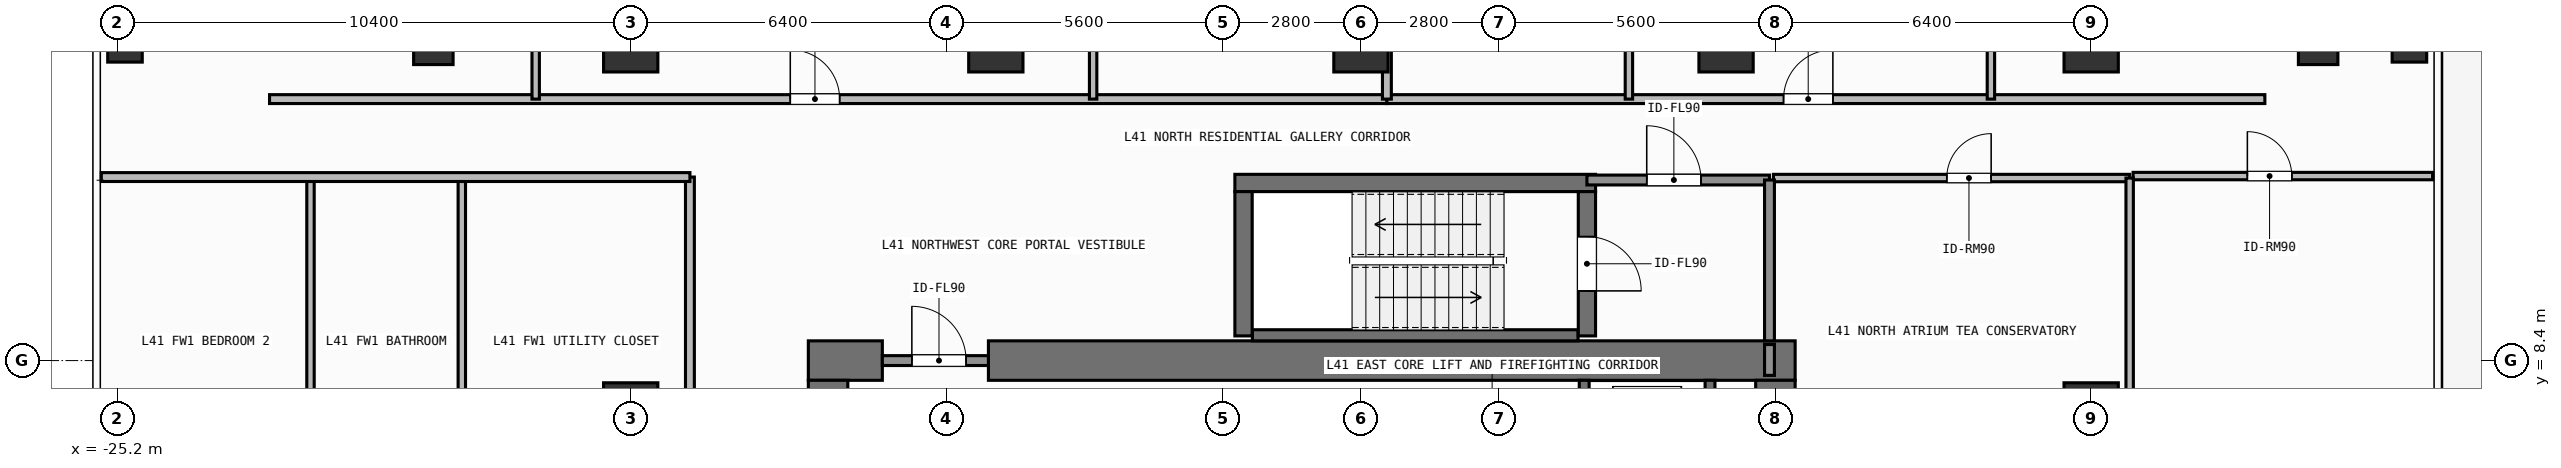
"""IFC4 building model, lengths in metres.
Left out: names, types, materials, properties, quantities, classifications, styles, units other than length and angle.
Written with IfcOpenShell. Run it as: python <this file> out.ifc"""

import sys

from ifc_helpers import new_model, si_unit, direction, frame, frame_2d, origin, origin_2d, place, context, subcontext, project, spatial, rectangle, hollow_rectangle, extrude, element, fill, save


model = new_model("IFC4")
c1 = context("Model", 3, precision=1e-05, world=origin(), true_north=direction((0.0, 1.0)))
c2 = subcontext(c1, "Body", "Model", "MODEL_VIEW")
j1 = project(units=[si_unit("LENGTHUNIT", "METRE"), si_unit("PLANEANGLEUNIT", "RADIAN")], contexts=[c1])
p1 = place(None, origin())
s1 = spatial("IfcSite", under=j1, at=p1, CompositionType="ELEMENT")
p2 = place(p1, origin())
s2 = spatial("IfcBuilding", under=s1, at=p2, CompositionType="ELEMENT")
p3 = place(p2, frame((0.0, 0.0, 168.0)))
s3 = spatial("IfcBuildingStorey", under=s2, at=p3, CompositionType="ELEMENT", Elevation=168.0)
p4 = place(p3, frame((-11.2, 8.4, 0.0), z_axis=(0.0, 0.0, 1.0), x_axis=(1.0, 0.0, 0.0)))
e1 = element("IfcWall", 1, at=p4, inside=s3, PredefinedType="SHEAR", context=c2, shape_type="SweptSolid", body=[
    extrude(rectangle(XDim=1.5, YDim=0.8, at=frame_2d((0.75, 0.0))), origin(), (0.0, 0.0, 1.0), 3.9),
])
p5 = place(p3, frame((-7.55, 8.4, 0.0), z_axis=(0.0, 0.0, 1.0), x_axis=(1.0, 0.0, 0.0)))
e2 = element("IfcWall", 2, at=p5, inside=s3, PredefinedType="SHEAR", context=c2, shape_type="SweptSolid", body=[
    extrude(rectangle(XDim=16.35, YDim=0.8, at=frame_2d((8.175, 0.0))), origin(), (0.0, 0.0, 1.0), 3.9),
])
p6 = place(p3, frame((-10.8, -8.0, 0.0), z_axis=(0.0, 0.0, 1.0), x_axis=(0.0, 1.0, 0.0)))
e3 = element("IfcWall", 3, at=p6, inside=s3, PredefinedType="SHEAR", context=c2, shape_type="SweptSolid", body=[
    extrude(rectangle(XDim=16.0, YDim=0.8, at=frame_2d((8.0, 0.0))), origin(), (0.0, 0.0, 1.0), 3.9),
])
p7 = place(p3, frame((8.4, 5.825, 0.0), z_axis=(0.0, 0.0, 1.0), x_axis=(0.0, 1.0, 0.0)))
e4 = element("IfcWall", 4, at=p7, inside=s3, PredefinedType="SHEAR", context=c2, shape_type="SweptSolid", body=[
    extrude(rectangle(XDim=2.175, YDim=0.8, at=frame_2d((1.087, 0.0))), origin(), (0.0, 0.0, 1.0), 3.9),
])
p8 = place(p3, frame((-2.555, 12.0, 0.0), z_axis=(0.0, 0.0, 1.0), x_axis=(1.0, 0.0, 0.0)))
e5 = element("IfcWall", 5, at=p8, inside=s3, PredefinedType="SHEAR", context=c2, shape_type="SweptSolid", body=[
    extrude(rectangle(XDim=7.31, YDim=0.35, at=frame_2d((3.655, 0.0))), origin(), (0.0, 0.0, 1.0), 3.9),
])
p9 = place(p3, frame((-2.2, 8.913, 0.0), z_axis=(0.0, 0.0, 1.0), x_axis=(1.0, 0.0, 0.0)))
e6 = element("IfcWall", 6, at=p9, inside=s3, PredefinedType="SHEAR", context=c2, shape_type="SweptSolid", body=[
    extrude(rectangle(XDim=6.6, YDim=0.225, at=frame_2d((3.3, 0.0))), origin(), (0.0, 0.0, 1.0), 3.9),
])
p10 = place(p3, frame((-2.38, 8.9, 0.0), z_axis=(0.0, 0.0, 1.0), x_axis=(0.0, 1.0, 0.0)))
e7 = element("IfcWall", 7, at=p10, inside=s3, PredefinedType="SHEAR", context=c2, shape_type="SweptSolid", body=[
    extrude(rectangle(XDim=2.925, YDim=0.35, at=frame_2d((1.462, 0.0))), origin(), (0.0, 0.0, 1.0), 3.9),
])
p11 = place(p3, frame((4.58, 11.825, 0.0), z_axis=(0.0, 0.0, 1.0), x_axis=(0.0, -1.0, 0.0)))
e8 = element("IfcWall", 8, at=p11, inside=s3, PredefinedType="SHEAR", context=c2, shape_type="SweptSolid", body=[
    extrude(rectangle(XDim=2.925, YDim=0.35, at=frame_2d((1.462, 0.0))), origin(), (0.0, 0.0, 1.0), 3.9),
])
p12 = place(p11, frame((0.913, 0.0, 0.0)))
e9 = element("IfcOpeningElement", 9, at=p12, cuts=e8, PredefinedType="OPENING", context=c2, shape_type="SweptSolid", body=[
    extrude(rectangle(XDim=1.1, YDim=2.15, at=frame_2d((0.55, 1.075))), frame((0.0, 0.185, 0.0), z_axis=(0.0, -1.0, 0.0), x_axis=(1.0, 0.0, 0.0)), (0.0, 0.0, 1.0), 0.37),
])
for number, where, z_axis, x_axis in (
    (10, (-14.8, 14.8, 0.0), (0.0, 0.0, 1.0), (1.0, 0.0, 0.0)),
    (11, (-7.4, 14.8, 0.0), (0.0, 0.0, 1.0), (1.0, 0.0, 0.0)),
    (12, (0.0, 14.8, 0.0), (0.0, 0.0, 1.0), (1.0, 0.0, 0.0)),
    (13, (7.4, 14.8, 0.0), (0.0, 0.0, 1.0), (1.0, 0.0, 0.0)),
    (14, (14.8, 14.8, 0.0), (0.0, 0.0, 1.0), (1.0, 0.0, 0.0)),
    (15, (-14.8, 7.4, 0.0), (0.0, 0.0, 1.0), (1.0, 0.0, 0.0)),
    (16, (14.8, 7.4, 0.0), (0.0, 0.0, 1.0), (1.0, 0.0, 0.0)),
):
    element("IfcColumn", number, at=place(p3, frame(where, z_axis=z_axis, x_axis=x_axis)), inside=s3, PredefinedType="COLUMN", context=c2, shape_type="SweptSolid", body=[
        extrude(rectangle(XDim=1.1, YDim=1.1, at=origin_2d()), origin(), (0.0, 0.0, 1.0), 3.9),
    ])
for number, where, z_axis, x_axis in (
    (17, (-18.8, 14.8, 0.0), (0.0, 0.0, 1.0), (1.0, 0.0, 0.0)),
    (18, (19.4, 14.8, 0.0), (0.0, 0.0, 1.0), (1.0, 0.0, 0.0)),
):
    element("IfcColumn", number, at=place(p3, frame(where, z_axis=z_axis, x_axis=x_axis)), inside=s3, PredefinedType="COLUMN", context=c2, shape_type="SweptSolid", body=[
        extrude(hollow_rectangle(XDim=0.8, YDim=0.8, WallThickness=0.036, at=origin_2d()), origin(), (0.0, 0.0, 1.0), 3.9),
    ])
for number, where, z_axis, x_axis in (
    (19, (-25.05, 14.8, 0.0), (0.0, 0.0, 1.0), (1.0, 0.0, 0.0)),
    (20, (21.25, 14.8, 0.0), (0.0, 0.0, 1.0), (1.0, 0.0, 0.0)),
):
    element("IfcColumn", number, at=place(p3, frame(where, z_axis=z_axis, x_axis=x_axis)), inside=s3, PredefinedType="COLUMN", context=c2, shape_type="SweptSolid", body=[
        extrude(hollow_rectangle(XDim=0.7, YDim=0.7, WallThickness=0.032, at=origin_2d()), origin(), (0.0, 0.0, 1.0), 3.9),
    ])
p13 = place(p3, frame((4.525, 5.825, 0.0), z_axis=(0.0, 0.0, 1.0), x_axis=(0.0, 1.0, 0.0)))
e21 = element("IfcWall", 21, at=p13, inside=s3, PredefinedType="SHEAR", context=c2, shape_type="SweptSolid", body=[
    extrude(rectangle(XDim=2.175, YDim=0.2, at=frame_2d((1.087, 0.0))), origin(), (0.0, 0.0, 1.0), 3.68),
])
p14 = place(p13, frame((0.425, 0.0, 0.0)))
e22 = element("IfcOpeningElement", 22, at=p14, cuts=e21, PredefinedType="OPENING", context=c2, shape_type="SweptSolid", body=[
    extrude(rectangle(XDim=1.1, YDim=2.2, at=frame_2d((0.55, 1.1))), frame((0.0, 0.11, 0.0), z_axis=(0.0, -1.0, 0.0), x_axis=(1.0, 0.0, 0.0)), (0.0, 0.0, 1.0), 0.22),
])
p15 = place(p3, frame((7.075, 5.825, 0.0), z_axis=(0.0, 0.0, 1.0), x_axis=(0.0, 1.0, 0.0)))
e23 = element("IfcWall", 23, at=p15, inside=s3, PredefinedType="SHEAR", context=c2, shape_type="SweptSolid", body=[
    extrude(rectangle(XDim=2.175, YDim=0.2, at=frame_2d((1.087, 0.0))), origin(), (0.0, 0.0, 1.0), 3.68),
])
p16 = place(p3, frame((4.58, 12.06, 0.0), z_axis=(0.0, 0.0, 1.0), x_axis=(1.0, 0.0, 0.0)))
e24 = element("IfcWall", 24, at=p16, inside=s3, PredefinedType="SOLIDWALL", context=c2, shape_type="SweptSolid", body=[
    extrude(rectangle(XDim=3.7, YDim=0.2, at=frame_2d((1.85, 0.0))), origin(), (0.0, 0.0, 1.0), 3.68),
])
p17 = place(p16, frame((1.212, 0.0, 0.0)))
e25 = element("IfcOpeningElement", 25, at=p17, cuts=e24, PredefinedType="OPENING", context=c2, shape_type="SweptSolid", body=[
    extrude(rectangle(XDim=1.1, YDim=2.15, at=frame_2d((0.55, 1.075))), frame((0.0, 0.11, 0.0), z_axis=(0.0, -1.0, 0.0), x_axis=(1.0, 0.0, 0.0)), (0.0, 0.0, 1.0), 0.22),
])
p18 = place(p3, frame((-9.7, 8.4, 0.0), z_axis=(0.0, 0.0, 1.0), x_axis=(1.0, 0.0, 0.0)))
e26 = element("IfcWall", 26, at=p18, inside=s3, PredefinedType="SOLIDWALL", context=c2, shape_type="SweptSolid", body=[
    extrude(rectangle(XDim=2.15, YDim=0.2, at=frame_2d((1.075, 0.0))), origin(), (0.0, 0.0, 1.0), 2.82),
])
p19 = place(p18, frame((0.598, 0.0, 0.0)))
e27 = element("IfcOpeningElement", 27, at=p19, cuts=e26, PredefinedType="OPENING", context=c2, shape_type="SweptSolid", body=[
    extrude(rectangle(XDim=1.1, YDim=2.15, at=frame_2d((0.55, 1.075))), frame((0.0, 0.11, 0.0), z_axis=(0.0, -1.0, 0.0), x_axis=(1.0, 0.0, 0.0)), (0.0, 0.0, 1.0), 0.22),
])
p20 = place(p3, frame((8.36, 12.1, 0.0), z_axis=(0.0, 0.0, 1.0), x_axis=(1.0, 0.0, 0.0)))
e28 = element("IfcWall", 28, at=p20, inside=s3, PredefinedType="PARTITIONING", context=c2, shape_type="SweptSolid", body=[
    extrude(rectangle(XDim=7.22, YDim=0.15, at=frame_2d((3.61, 0.0))), origin(), (0.0, 0.0, 1.0), 3.68),
])
p21 = place(p20, frame((3.513, 0.0, 0.0)))
e29 = element("IfcOpeningElement", 29, at=p21, cuts=e28, PredefinedType="OPENING", context=c2, shape_type="SweptSolid", body=[
    extrude(rectangle(XDim=0.9, YDim=2.1, at=frame_2d((0.45, 1.05))), frame((0.0, 0.085, 0.0), z_axis=(0.0, -1.0, 0.0), x_axis=(1.0, 0.0, 0.0)), (0.0, 0.0, 1.0), 0.17),
])
p22 = place(p3, frame((-22.12, 13.7, 0.0), z_axis=(0.0, 0.0, 1.0), x_axis=(1.0, 0.0, 0.0)))
e30 = element("IfcWall", 30, at=p22, inside=s3, PredefinedType="PARTITIONING", context=c2, shape_type="SweptSolid", body=[
    extrude(rectangle(XDim=22.646, YDim=0.18, at=frame_2d((11.323, 0.0))), origin(), (0.0, 0.0, 1.0), 3.68),
])
p23 = place(p22, frame((10.554, 0.0, 0.0)))
e31 = element("IfcOpeningElement", 31, at=p23, cuts=e30, PredefinedType="OPENING", context=c2, shape_type="SweptSolid", body=[
    extrude(rectangle(XDim=1.0, YDim=2.2, at=frame_2d((0.5, 1.1))), frame((0.0, 0.1, 0.0), z_axis=(0.0, -1.0, 0.0), x_axis=(1.0, 0.0, 0.0)), (0.0, 0.0, 1.0), 0.2),
])
p24 = place(p3, frame((-16.726, 13.7, 0.0), z_axis=(0.0, 0.0, 1.0), x_axis=(0.0, 1.0, 0.0)))
e32 = element("IfcWall", 32, at=p24, inside=s3, PredefinedType="PARTITIONING", context=c2, shape_type="SweptSolid", body=[
    extrude(rectangle(XDim=5.934, YDim=0.15, at=frame_2d((2.967, 0.0))), origin(), (0.0, 0.0, 1.0), 3.68),
])
p25 = place(p24, frame((2.63, 0.0, 0.0)))
e33 = element("IfcOpeningElement", 33, at=p25, cuts=e32, PredefinedType="OPENING", context=c2, shape_type="SweptSolid", body=[
    extrude(rectangle(XDim=0.85, YDim=2.1, at=frame_2d((0.425, 1.05))), frame((0.0, 0.085, 0.0), z_axis=(0.0, -1.0, 0.0), x_axis=(1.0, 0.0, 0.0)), (0.0, 0.0, 1.0), 0.17),
])
p26 = place(p3, frame((-5.428, 13.7, 0.0), z_axis=(0.0, 0.0, 1.0), x_axis=(0.0, 1.0, 0.0)))
e34 = element("IfcWall", 34, at=p26, inside=s3, PredefinedType="PARTITIONING", context=c2, shape_type="SweptSolid", body=[
    extrude(rectangle(XDim=4.154, YDim=0.15, at=frame_2d((2.077, 0.0))), origin(), (0.0, 0.0, 1.0), 3.68),
])
p27 = place(p26, frame((1.74, 0.0, 0.0)))
e35 = element("IfcOpeningElement", 35, at=p27, cuts=e34, PredefinedType="OPENING", context=c2, shape_type="SweptSolid", body=[
    extrude(rectangle(XDim=0.85, YDim=2.1, at=frame_2d((0.425, 1.05))), frame((0.0, 0.085, 0.0), z_axis=(0.0, -1.0, 0.0), x_axis=(1.0, 0.0, 0.0)), (0.0, 0.0, 1.0), 0.17),
])
p28 = place(p3, frame((0.526, 13.7, 0.0), z_axis=(0.0, 0.0, 1.0), x_axis=(1.0, 0.0, 0.0)))
e36 = element("IfcWall", 36, at=p28, inside=s3, PredefinedType="PARTITIONING", context=c2, shape_type="SweptSolid", body=[
    extrude(rectangle(XDim=17.794, YDim=0.18, at=frame_2d((8.897, 0.0))), origin(), (0.0, 0.0, 1.0), 3.68),
])
p29 = place(p28, frame((8.039, 0.0, 0.0)))
e37 = element("IfcOpeningElement", 37, at=p29, cuts=e36, PredefinedType="OPENING", context=c2, shape_type="SweptSolid", body=[
    extrude(rectangle(XDim=1.0, YDim=2.2, at=frame_2d((0.5, 1.1))), frame((0.0, 0.1, 0.0), z_axis=(0.0, -1.0, 0.0), x_axis=(1.0, 0.0, 0.0)), (0.0, 0.0, 1.0), 0.2),
])
p30 = place(p3, frame((5.431, 13.7, 0.0), z_axis=(0.0, 0.0, 1.0), x_axis=(0.0, 1.0, 0.0)))
e38 = element("IfcWall", 38, at=p30, inside=s3, PredefinedType="PARTITIONING", context=c2, shape_type="SweptSolid", body=[
    extrude(rectangle(XDim=5.69, YDim=0.15, at=frame_2d((2.845, 0.0))), origin(), (0.0, 0.0, 1.0), 3.68),
])
p31 = place(p30, frame((2.42, 0.0, 0.0)))
e39 = element("IfcOpeningElement", 39, at=p31, cuts=e38, PredefinedType="OPENING", context=c2, shape_type="SweptSolid", body=[
    extrude(rectangle(XDim=0.85, YDim=2.1, at=frame_2d((0.425, 1.05))), frame((0.0, 0.085, 0.0), z_axis=(0.0, -1.0, 0.0), x_axis=(1.0, 0.0, 0.0)), (0.0, 0.0, 1.0), 0.17),
])
p32 = place(p3, frame((12.768, 13.7, 0.0), z_axis=(0.0, 0.0, 1.0), x_axis=(0.0, 1.0, 0.0)))
e40 = element("IfcWall", 40, at=p32, inside=s3, PredefinedType="PARTITIONING", context=c2, shape_type="SweptSolid", body=[
    extrude(rectangle(XDim=3.983, YDim=0.15, at=frame_2d((1.992, 0.0))), origin(), (0.0, 0.0, 1.0), 3.68),
])
p33 = place(p32, frame((1.566, 0.0, 0.0)))
e41 = element("IfcOpeningElement", 41, at=p33, cuts=e40, PredefinedType="OPENING", context=c2, shape_type="SweptSolid", body=[
    extrude(rectangle(XDim=0.85, YDim=2.1, at=frame_2d((0.425, 1.05))), frame((0.0, 0.085, 0.0), z_axis=(0.0, -1.0, 0.0), x_axis=(1.0, 0.0, 0.0)), (0.0, 0.0, 1.0), 0.17),
])
p34 = place(p3, frame((-13.6, -12.12, 0.0), z_axis=(0.0, 0.0, 1.0), x_axis=(0.0, 1.0, 0.0)))
e42 = element("IfcWall", 42, at=p34, inside=s3, PredefinedType="PARTITIONING", context=c2, shape_type="SweptSolid", body=[
    extrude(rectangle(XDim=24.24, YDim=0.18, at=frame_2d((12.12, 0.0))), origin(), (0.0, 0.0, 1.0), 3.68),
])
p35 = place(p34, frame((11.62, 0.0, 0.0)))
e43 = element("IfcOpeningElement", 43, at=p35, cuts=e42, PredefinedType="OPENING", context=c2, shape_type="SweptSolid", body=[
    extrude(rectangle(XDim=1.0, YDim=2.2, at=frame_2d((0.5, 1.1))), frame((0.0, 0.1, 0.0), z_axis=(0.0, -1.0, 0.0), x_axis=(1.0, 0.0, 0.0)), (0.0, 0.0, 1.0), 0.2),
])
p36 = place(p3, frame((15.65, 12.14, 0.0), z_axis=(0.0, 0.0, 1.0), x_axis=(1.0, 0.0, 0.0)))
e44 = element("IfcWall", 44, at=p36, inside=s3, PredefinedType="PARTITIONING", context=c2, shape_type="SweptSolid", body=[
    extrude(rectangle(XDim=6.07, YDim=0.15, at=frame_2d((3.035, 0.0))), origin(), (0.0, 0.0, 1.0), 3.68),
])
p37 = place(p36, frame((2.316, 0.0, 0.0)))
e45 = element("IfcOpeningElement", 45, at=p37, cuts=e44, PredefinedType="OPENING", context=c2, shape_type="SweptSolid", body=[
    extrude(rectangle(XDim=0.9, YDim=2.1, at=frame_2d((0.45, 1.05))), frame((0.0, 0.085, 0.0), z_axis=(0.0, -1.0, 0.0), x_axis=(1.0, 0.0, 0.0)), (0.0, 0.0, 1.0), 0.17),
])
p38 = place(p3, frame((8.28, 8.8, 0.0), z_axis=(0.0, 0.0, 1.0), x_axis=(0.0, 1.0, 0.0)))
e46 = element("IfcWall", 46, at=p38, inside=s3, PredefinedType="SOLIDWALL", context=c2, shape_type="SweptSolid", body=[
    extrude(rectangle(XDim=3.26, YDim=0.2, at=frame_2d((1.63, 0.0))), origin(), (0.0, 0.0, 1.0), 3.68),
])
p39 = place(p3, frame((8.28, 8.1, 0.0), z_axis=(0.0, 0.0, 1.0), x_axis=(0.0, 1.0, 0.0)))
e47 = element("IfcWall", 47, at=p39, inside=s3, PredefinedType="SOLIDWALL", context=c2, shape_type="SweptSolid", body=[
    extrude(rectangle(XDim=0.625, YDim=0.2, at=frame_2d((0.312, 0.0))), origin(), (0.0, 0.0, 1.0), 3.68),
])
p40 = place(p3, frame((15.58, 5.85, 0.0), z_axis=(0.0, 0.0, 1.0), x_axis=(0.0, 1.0, 0.0)))
e48 = element("IfcWall", 48, at=p40, inside=s3, PredefinedType="PARTITIONING", context=c2, shape_type="SweptSolid", body=[
    extrude(rectangle(XDim=6.25, YDim=0.15, at=frame_2d((3.125, 0.0))), origin(), (0.0, 0.0, 1.0), 3.68),
])
p41 = place(p3, frame((0.526, 13.7, 0.0), z_axis=(0.0, 0.0, 1.0), x_axis=(0.0, 1.0, 0.0)))
e49 = element("IfcWall", 49, at=p41, inside=s3, PredefinedType="PARTITIONING", context=c2, shape_type="SweptSolid", body=[
    extrude(rectangle(XDim=9.93, YDim=0.18, at=frame_2d((4.965, 0.0))), origin(), (0.0, 0.0, 1.0), 3.68),
])
for number, where, z_axis, x_axis in (
    (50, (-18.223, 5.436, 0.0), (0.0, 0.0, 1.0), (0.0, 1.0, 0.0)),
    (51, (-21.29, 5.436, 0.0), (0.0, 0.0, 1.0), (0.0, 1.0, 0.0)),
):
    element("IfcWall", number, at=place(p3, frame(where, z_axis=z_axis, x_axis=x_axis)), inside=s3, PredefinedType="PARTITIONING", context=c2, shape_type="SweptSolid", body=[
        extrude(rectangle(XDim=6.684, YDim=0.15, at=frame_2d((3.342, 0.0))), origin(), (0.0, 0.0, 1.0), 3.68),
    ])
p42 = place(p3, frame((-25.53, 12.12, 0.0), z_axis=(0.0, 0.0, 1.0), x_axis=(1.0, 0.0, 0.0)))
e52 = element("IfcWall", 52, at=p42, inside=s3, PredefinedType="PARTITIONING", context=c2, shape_type="SweptSolid", body=[
    extrude(rectangle(XDim=11.93, YDim=0.18, at=frame_2d((5.965, 0.0))), origin(), (0.0, 0.0, 1.0), 3.68),
])
p43 = place(p12, origin())
e53 = element("IfcDoor", 53, at=p43, inside=s3, OperationType="SINGLE_SWING_RIGHT", PredefinedType="DOOR", context=c2, shape_type="SweptSolid", body=[
    extrude(rectangle(XDim=1.1, YDim=2.15, at=frame_2d((0.55, 1.075))), frame((0.0, 0.025, 0.0), z_axis=(0.0, -1.0, 0.0), x_axis=(1.0, 0.0, 0.0)), (0.0, 0.0, 1.0), 0.05),
])
fill(e9, e53)
p44 = place(p17, origin())
e54 = element("IfcDoor", 54, at=p44, inside=s3, OperationType="SINGLE_SWING_LEFT", PredefinedType="DOOR", context=c2, shape_type="SweptSolid", body=[
    extrude(rectangle(XDim=1.1, YDim=2.15, at=frame_2d((0.55, 1.075))), frame((0.0, 0.025, 0.0), z_axis=(0.0, -1.0, 0.0), x_axis=(1.0, 0.0, 0.0)), (0.0, 0.0, 1.0), 0.05),
])
fill(e25, e54)
p45 = place(p19, origin())
e55 = element("IfcDoor", 55, at=p45, inside=s3, OperationType="SINGLE_SWING_LEFT", PredefinedType="DOOR", context=c2, shape_type="SweptSolid", body=[
    extrude(rectangle(XDim=1.1, YDim=2.15, at=frame_2d((0.55, 1.075))), frame((0.0, 0.025, 0.0), z_axis=(0.0, -1.0, 0.0), x_axis=(1.0, 0.0, 0.0)), (0.0, 0.0, 1.0), 0.05),
])
fill(e27, e55)
p46 = place(p21, origin())
e56 = element("IfcDoor", 56, at=p46, inside=s3, OperationType="SINGLE_SWING_RIGHT", PredefinedType="DOOR", context=c2, shape_type="SweptSolid", body=[
    extrude(rectangle(XDim=0.9, YDim=2.1, at=frame_2d((0.45, 1.05))), frame((0.0, 0.025, 0.0), z_axis=(0.0, -1.0, 0.0), x_axis=(1.0, 0.0, 0.0)), (0.0, 0.0, 1.0), 0.05),
])
fill(e29, e56)
p47 = place(p23, origin())
e57 = element("IfcDoor", 57, at=p47, inside=s3, OperationType="SINGLE_SWING_LEFT", PredefinedType="DOOR", context=c2, shape_type="SweptSolid", body=[
    extrude(rectangle(XDim=1.0, YDim=2.2, at=frame_2d((0.5, 1.1))), frame((0.0, 0.025, 0.0), z_axis=(0.0, -1.0, 0.0), x_axis=(1.0, 0.0, 0.0)), (0.0, 0.0, 1.0), 0.05),
])
fill(e31, e57)
p48 = place(p29, origin())
e58 = element("IfcDoor", 58, at=p48, inside=s3, OperationType="SINGLE_SWING_RIGHT", PredefinedType="DOOR", context=c2, shape_type="SweptSolid", body=[
    extrude(rectangle(XDim=1.0, YDim=2.2, at=frame_2d((0.5, 1.1))), frame((0.0, 0.025, 0.0), z_axis=(0.0, -1.0, 0.0), x_axis=(1.0, 0.0, 0.0)), (0.0, 0.0, 1.0), 0.05),
])
fill(e37, e58)
p49 = place(p37, origin())
e59 = element("IfcDoor", 59, at=p49, inside=s3, OperationType="SINGLE_SWING_LEFT", PredefinedType="DOOR", context=c2, shape_type="SweptSolid", body=[
    extrude(rectangle(XDim=0.9, YDim=2.1, at=frame_2d((0.45, 1.05))), frame((0.0, 0.025, 0.0), z_axis=(0.0, -1.0, 0.0), x_axis=(1.0, 0.0, 0.0)), (0.0, 0.0, 1.0), 0.05),
])
fill(e45, e59)
save(model, sys.argv[1])
